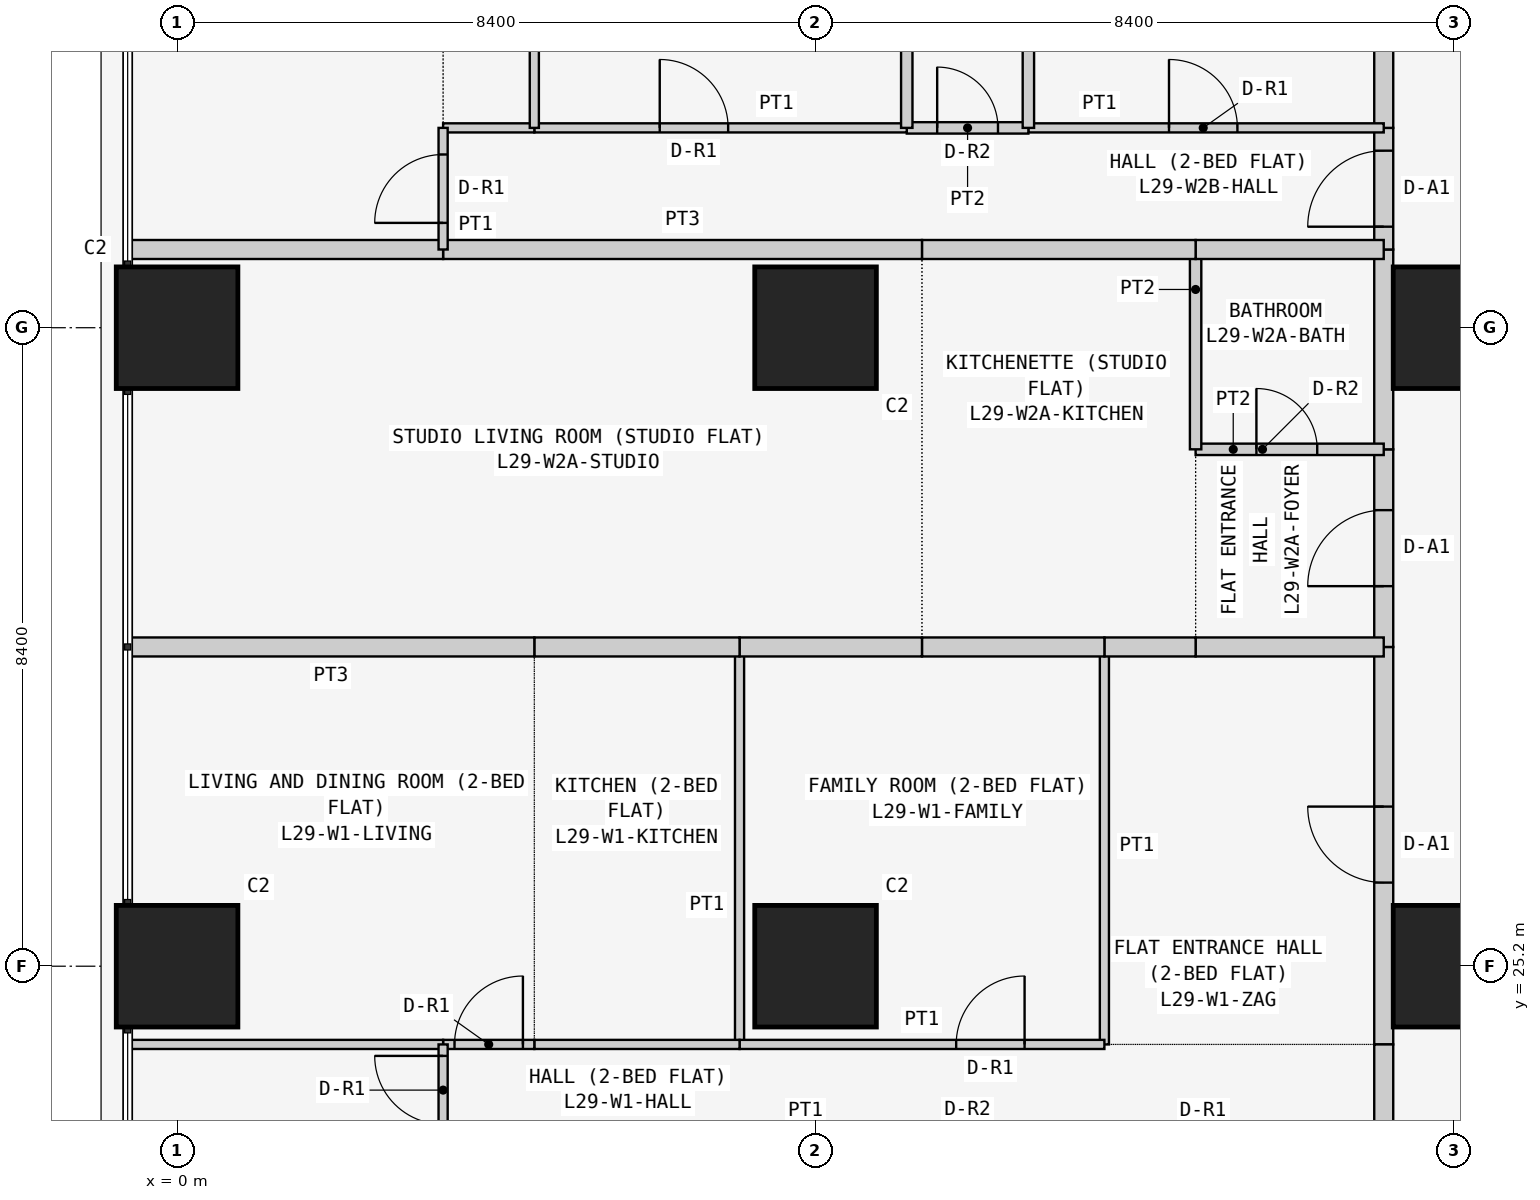
"""IFC4 building model, lengths in metres.
Left out: names, types, materials, properties, quantities, classifications, styles, units other than length and angle.
Written with IfcOpenShell. Run it as: python <this file> out.ifc"""

import sys

from ifc_helpers import new_model, si_unit, direction, frame, frame_2d, origin, origin_2d, place, context, subcontext, project, spatial, rectangle, extrude, element, fill, save


model = new_model("IFC4")
c1 = context("Model", 3, precision=1e-05, world=origin(), true_north=direction((0.0, 1.0)))
c2 = subcontext(c1, "Body", "Model", "MODEL_VIEW")
j1 = project(units=[si_unit("LENGTHUNIT", "METRE"), si_unit("PLANEANGLEUNIT", "RADIAN")], contexts=[c1])
p1 = place(None, origin())
s1 = spatial("IfcSite", under=j1, at=p1, CompositionType="ELEMENT")
p2 = place(p1, origin())
s2 = spatial("IfcBuilding", under=s1, at=p2, CompositionType="ELEMENT")
p3 = place(p2, frame((0.0, 0.0, 116.1)))
s3 = spatial("IfcBuildingStorey", under=s2, at=p3, CompositionType="ELEMENT", Elevation=116.1)
for number, where, z_axis, x_axis in (
    (1, (0.0, 25.2, 0.0), (0.0, 0.0, 1.0), (1.0, 0.0, 0.0)),
    (2, (0.0, 33.6, 0.0), (0.0, 0.0, 1.0), (1.0, 0.0, 0.0)),
    (3, (8.4, 25.2, 0.0), (0.0, 0.0, 1.0), (1.0, 0.0, 0.0)),
    (4, (8.4, 33.6, 0.0), (0.0, 0.0, 1.0), (1.0, 0.0, 0.0)),
    (5, (16.8, 25.2, 0.0), (0.0, 0.0, 1.0), (1.0, 0.0, 0.0)),
    (6, (16.8, 33.6, 0.0), (0.0, 0.0, 1.0), (1.0, 0.0, 0.0)),
):
    element("IfcColumn", number, at=place(p3, frame(where, z_axis=z_axis, x_axis=x_axis)), inside=s3, PredefinedType="COLUMN", context=c2, shape_type="SweptSolid", body=[
        extrude(rectangle(XDim=1.6, YDim=1.6, at=origin_2d()), origin(), (0.0, 0.0, 1.0), 3.6),
    ])
p4 = place(p3, frame((15.875, 24.171, 0.0), z_axis=(0.0, 0.0, 1.0), x_axis=(0.0, 1.0, 0.0)))
e7 = element("IfcWall", 7, at=p4, inside=s3, PredefinedType="PARTITIONING", context=c2, shape_type="SweptSolid", body=[
    extrude(rectangle(XDim=5.229, YDim=0.25, at=frame_2d((2.615, 0.0))), origin(), (0.0, 0.0, 1.0), 3.45),
])
p5 = place(p4, frame((2.129, 0.0, 0.0)))
e8 = element("IfcOpeningElement", 8, at=p5, cuts=e7, PredefinedType="OPENING", context=c2, shape_type="SweptSolid", body=[
    extrude(rectangle(XDim=1.0, YDim=2.1, at=frame_2d((0.5, 1.05))), frame((0.0, 0.135, 0.0), z_axis=(0.0, -1.0, 0.0), x_axis=(1.0, 0.0, 0.0)), (0.0, 0.0, 1.0), 0.27),
])
p6 = place(p3, frame((15.875, 22.971, 0.0), z_axis=(0.0, 0.0, 1.0), x_axis=(0.0, 1.0, 0.0)))
e9 = element("IfcWall", 9, at=p6, inside=s3, PredefinedType="PARTITIONING", context=c2, shape_type="SweptSolid", body=[
    extrude(rectangle(XDim=1.2, YDim=0.25, at=frame_2d((0.6, 0.0))), origin(), (0.0, 0.0, 1.0), 3.45),
])
p7 = place(p3, frame((15.875, 29.4, 0.0), z_axis=(0.0, 0.0, 1.0), x_axis=(0.0, 1.0, 0.0)))
e10 = element("IfcWall", 10, at=p7, inside=s3, PredefinedType="PARTITIONING", context=c2, shape_type="SweptSolid", body=[
    extrude(rectangle(XDim=2.6, YDim=0.25, at=frame_2d((1.3, 0.0))), origin(), (0.0, 0.0, 1.0), 3.45),
])
p8 = place(p7, frame((0.8, 0.0, 0.0)))
e11 = element("IfcOpeningElement", 11, at=p8, cuts=e10, PredefinedType="OPENING", context=c2, shape_type="SweptSolid", body=[
    extrude(rectangle(XDim=1.0, YDim=2.1, at=frame_2d((0.5, 1.05))), frame((0.0, 0.135, 0.0), z_axis=(0.0, -1.0, 0.0), x_axis=(1.0, 0.0, 0.0)), (0.0, 0.0, 1.0), 0.27),
])
p9 = place(p3, frame((15.875, 32.0, 0.0), z_axis=(0.0, 0.0, 1.0), x_axis=(0.0, 1.0, 0.0)))
e12 = element("IfcWall", 12, at=p9, inside=s3, PredefinedType="PARTITIONING", context=c2, shape_type="SweptSolid", body=[
    extrude(rectangle(XDim=2.629, YDim=0.25, at=frame_2d((1.314, 0.0))), origin(), (0.0, 0.0, 1.0), 3.45),
])
p10 = place(p3, frame((15.875, 34.629, 0.0), z_axis=(0.0, 0.0, 1.0), x_axis=(0.0, 1.0, 0.0)))
e13 = element("IfcWall", 13, at=p10, inside=s3, PredefinedType="PARTITIONING", context=c2, shape_type="SweptSolid", body=[
    extrude(rectangle(XDim=1.6, YDim=0.25, at=frame_2d((0.8, 0.0))), origin(), (0.0, 0.0, 1.0), 3.45),
])
p11 = place(p10, frame((0.3, 0.0, 0.0)))
e14 = element("IfcOpeningElement", 14, at=p11, cuts=e13, PredefinedType="OPENING", context=c2, shape_type="SweptSolid", body=[
    extrude(rectangle(XDim=1.0, YDim=2.1, at=frame_2d((0.5, 1.05))), frame((0.0, 0.135, 0.0), z_axis=(0.0, -1.0, 0.0), x_axis=(1.0, 0.0, 0.0)), (0.0, 0.0, 1.0), 0.27),
])
p12 = place(p3, frame((15.875, 36.229, 0.0), z_axis=(0.0, 0.0, 1.0), x_axis=(0.0, 1.0, 0.0)))
e15 = element("IfcWall", 15, at=p12, inside=s3, PredefinedType="PARTITIONING", context=c2, shape_type="SweptSolid", body=[
    extrude(rectangle(XDim=6.471, YDim=0.25, at=frame_2d((3.235, 0.0))), origin(), (0.0, 0.0, 1.0), 3.45),
])
p13 = place(p3, frame((12.2, 29.4, 0.0), z_axis=(0.0, 0.0, 1.0), x_axis=(0.0, -1.0, 0.0)))
e16 = element("IfcWall", 16, at=p13, inside=s3, PredefinedType="PARTITIONING", context=c2, shape_type="SweptSolid", body=[
    extrude(rectangle(XDim=5.229, YDim=0.12, at=frame_2d((2.615, 0.0))), origin(), (0.0, 0.0, 1.0), 3.45),
])
p14 = place(p3, frame((15.875, 29.4, 0.0), z_axis=(0.0, 0.0, 1.0), x_axis=(-1.0, 0.0, 0.0)))
e17 = element("IfcWall", 17, at=p14, inside=s3, PredefinedType="PARTITIONING", context=c2, shape_type="SweptSolid", body=[
    extrude(rectangle(XDim=2.475, YDim=0.25, at=frame_2d((1.238, 0.0))), origin(), (0.0, 0.0, 1.0), 3.45),
])
p15 = place(p3, frame((13.4, 29.4, 0.0), z_axis=(0.0, 0.0, 1.0), x_axis=(-1.0, 0.0, 0.0)))
e18 = element("IfcWall", 18, at=p15, inside=s3, PredefinedType="PARTITIONING", context=c2, shape_type="SweptSolid", body=[
    extrude(rectangle(XDim=1.2, YDim=0.25, at=frame_2d((0.6, 0.0))), origin(), (0.0, 0.0, 1.0), 3.45),
])
p16 = place(p3, frame((7.4, 29.4, 0.0), z_axis=(0.0, 0.0, 1.0), x_axis=(0.0, -1.0, 0.0)))
e19 = element("IfcWall", 19, at=p16, inside=s3, PredefinedType="PARTITIONING", context=c2, shape_type="SweptSolid", body=[
    extrude(rectangle(XDim=5.229, YDim=0.12, at=frame_2d((2.615, 0.0))), origin(), (0.0, 0.0, 1.0), 3.45),
])
p17 = place(p3, frame((7.4, 24.171, 0.0), z_axis=(0.0, 0.0, 1.0), x_axis=(1.0, 0.0, 0.0)))
e20 = element("IfcWall", 20, at=p17, inside=s3, PredefinedType="PARTITIONING", context=c2, shape_type="SweptSolid", body=[
    extrude(rectangle(XDim=4.8, YDim=0.12, at=frame_2d((2.4, 0.0))), origin(), (0.0, 0.0, 1.0), 3.45),
])
p18 = place(p17, frame((2.85, 0.0, 0.0)))
e21 = element("IfcOpeningElement", 21, at=p18, cuts=e20, PredefinedType="OPENING", context=c2, shape_type="SweptSolid", body=[
    extrude(rectangle(XDim=0.9, YDim=2.1, at=frame_2d((0.45, 1.05))), frame((0.0, 0.07, 0.0), z_axis=(0.0, -1.0, 0.0), x_axis=(1.0, 0.0, 0.0)), (0.0, 0.0, 1.0), 0.14),
])
p19 = place(p3, frame((12.2, 29.4, 0.0), z_axis=(0.0, 0.0, 1.0), x_axis=(-1.0, 0.0, 0.0)))
e22 = element("IfcWall", 22, at=p19, inside=s3, PredefinedType="PARTITIONING", context=c2, shape_type="SweptSolid", body=[
    extrude(rectangle(XDim=2.4, YDim=0.25, at=frame_2d((1.2, 0.0))), origin(), (0.0, 0.0, 1.0), 3.45),
])
p20 = place(p3, frame((9.8, 29.4, 0.0), z_axis=(0.0, 0.0, 1.0), x_axis=(-1.0, 0.0, 0.0)))
e23 = element("IfcWall", 23, at=p20, inside=s3, PredefinedType="PARTITIONING", context=c2, shape_type="SweptSolid", body=[
    extrude(rectangle(XDim=2.4, YDim=0.25, at=frame_2d((1.2, 0.0))), origin(), (0.0, 0.0, 1.0), 3.45),
])
p21 = place(p3, frame((4.7, 24.171, 0.0), z_axis=(0.0, 0.0, 1.0), x_axis=(1.0, 0.0, 0.0)))
e24 = element("IfcWall", 24, at=p21, inside=s3, PredefinedType="PARTITIONING", context=c2, shape_type="SweptSolid", body=[
    extrude(rectangle(XDim=2.7, YDim=0.12, at=frame_2d((1.35, 0.0))), origin(), (0.0, 0.0, 1.0), 3.45),
])
p22 = place(p3, frame((7.4, 29.4, 0.0), z_axis=(0.0, 0.0, 1.0), x_axis=(-1.0, 0.0, 0.0)))
e25 = element("IfcWall", 25, at=p22, inside=s3, PredefinedType="PARTITIONING", context=c2, shape_type="SweptSolid", body=[
    extrude(rectangle(XDim=2.7, YDim=0.25, at=frame_2d((1.35, 0.0))), origin(), (0.0, 0.0, 1.0), 3.45),
])
p23 = place(p3, frame((3.5, 24.171, 0.0), z_axis=(0.0, 0.0, 1.0), x_axis=(1.0, 0.0, 0.0)))
e26 = element("IfcWall", 26, at=p23, inside=s3, PredefinedType="PARTITIONING", context=c2, shape_type="SweptSolid", body=[
    extrude(rectangle(XDim=1.2, YDim=0.12, at=frame_2d((0.6, 0.0))), origin(), (0.0, 0.0, 1.0), 3.45),
])
p24 = place(p23, frame((0.15, 0.0, 0.0)))
e27 = element("IfcOpeningElement", 27, at=p24, cuts=e26, PredefinedType="OPENING", context=c2, shape_type="SweptSolid", body=[
    extrude(rectangle(XDim=0.9, YDim=2.1, at=frame_2d((0.45, 1.05))), frame((0.0, 0.07, 0.0), z_axis=(0.0, -1.0, 0.0), x_axis=(1.0, 0.0, 0.0)), (0.0, 0.0, 1.0), 0.14),
])
p25 = place(p3, frame((-0.65, 24.171, 0.0), z_axis=(0.0, 0.0, 1.0), x_axis=(1.0, 0.0, 0.0)))
e28 = element("IfcWall", 28, at=p25, inside=s3, PredefinedType="PARTITIONING", context=c2, shape_type="SweptSolid", body=[
    extrude(rectangle(XDim=4.15, YDim=0.12, at=frame_2d((2.075, 0.0))), origin(), (0.0, 0.0, 1.0), 3.45),
])
p26 = place(p3, frame((4.7, 29.4, 0.0), z_axis=(0.0, 0.0, 1.0), x_axis=(-1.0, 0.0, 0.0)))
e29 = element("IfcWall", 29, at=p26, inside=s3, PredefinedType="PARTITIONING", context=c2, shape_type="SweptSolid", body=[
    extrude(rectangle(XDim=5.35, YDim=0.25, at=frame_2d((2.675, 0.0))), origin(), (0.0, 0.0, 1.0), 3.45),
])
p27 = place(p3, frame((3.5, 24.171, 0.0), z_axis=(0.0, 0.0, 1.0), x_axis=(0.0, -1.0, 0.0)))
e30 = element("IfcWall", 30, at=p27, inside=s3, PredefinedType="PARTITIONING", context=c2, shape_type="SweptSolid", body=[
    extrude(rectangle(XDim=1.2, YDim=0.12, at=frame_2d((0.6, 0.0))), origin(), (0.0, 0.0, 1.0), 3.45),
])
p28 = place(p27, frame((0.151, 0.0, 0.0)))
e31 = element("IfcOpeningElement", 31, at=p28, cuts=e30, PredefinedType="OPENING", context=c2, shape_type="SweptSolid", body=[
    extrude(rectangle(XDim=0.9, YDim=2.1, at=frame_2d((0.45, 1.05))), frame((0.0, 0.07, 0.0), z_axis=(0.0, -1.0, 0.0), x_axis=(1.0, 0.0, 0.0)), (0.0, 0.0, 1.0), 0.14),
])
p29 = place(p3, frame((13.4, 32.0, 0.0), z_axis=(0.0, 0.0, 1.0), x_axis=(1.0, 0.0, 0.0)))
e32 = element("IfcWall", 32, at=p29, inside=s3, PredefinedType="PARTITIONING", context=c2, shape_type="SweptSolid", body=[
    extrude(rectangle(XDim=2.475, YDim=0.15, at=frame_2d((1.238, 0.0))), origin(), (0.0, 0.0, 1.0), 3.45),
])
p30 = place(p29, frame((0.8, 0.0, 0.0)))
e33 = element("IfcOpeningElement", 33, at=p30, cuts=e32, PredefinedType="OPENING", context=c2, shape_type="SweptSolid", body=[
    extrude(rectangle(XDim=0.8, YDim=2.1, at=frame_2d((0.4, 1.05))), frame((0.0, 0.085, 0.0), z_axis=(0.0, -1.0, 0.0), x_axis=(1.0, 0.0, 0.0)), (0.0, 0.0, 1.0), 0.17),
])
p31 = place(p3, frame((13.4, 32.0, 0.0), z_axis=(0.0, 0.0, 1.0), x_axis=(0.0, 1.0, 0.0)))
e34 = element("IfcWall", 34, at=p31, inside=s3, PredefinedType="PARTITIONING", context=c2, shape_type="SweptSolid", body=[
    extrude(rectangle(XDim=2.629, YDim=0.15, at=frame_2d((1.314, 0.0))), origin(), (0.0, 0.0, 1.0), 3.45),
])
p32 = place(p3, frame((13.4, 34.629, 0.0), z_axis=(0.0, 0.0, 1.0), x_axis=(1.0, 0.0, 0.0)))
e35 = element("IfcWall", 35, at=p32, inside=s3, PredefinedType="PARTITIONING", context=c2, shape_type="SweptSolid", body=[
    extrude(rectangle(XDim=2.475, YDim=0.25, at=frame_2d((1.238, 0.0))), origin(), (0.0, 0.0, 1.0), 3.45),
])
p33 = place(p3, frame((9.8, 34.629, 0.0), z_axis=(0.0, 0.0, 1.0), x_axis=(1.0, 0.0, 0.0)))
e36 = element("IfcWall", 36, at=p33, inside=s3, PredefinedType="PARTITIONING", context=c2, shape_type="SweptSolid", body=[
    extrude(rectangle(XDim=3.6, YDim=0.25, at=frame_2d((1.8, 0.0))), origin(), (0.0, 0.0, 1.0), 3.45),
])
p34 = place(p3, frame((3.5, 34.629, 0.0), z_axis=(0.0, 0.0, 1.0), x_axis=(1.0, 0.0, 0.0)))
e37 = element("IfcWall", 37, at=p34, inside=s3, PredefinedType="PARTITIONING", context=c2, shape_type="SweptSolid", body=[
    extrude(rectangle(XDim=6.3, YDim=0.25, at=frame_2d((3.15, 0.0))), origin(), (0.0, 0.0, 1.0), 3.45),
])
p35 = place(p3, frame((-0.65, 34.629, 0.0), z_axis=(0.0, 0.0, 1.0), x_axis=(1.0, 0.0, 0.0)))
e38 = element("IfcWall", 38, at=p35, inside=s3, PredefinedType="PARTITIONING", context=c2, shape_type="SweptSolid", body=[
    extrude(rectangle(XDim=4.15, YDim=0.25, at=frame_2d((2.075, 0.0))), origin(), (0.0, 0.0, 1.0), 3.45),
])
p36 = place(p3, frame((11.2, 36.229, 0.0), z_axis=(0.0, 0.0, 1.0), x_axis=(1.0, 0.0, 0.0)))
e39 = element("IfcWall", 39, at=p36, inside=s3, PredefinedType="PARTITIONING", context=c2, shape_type="SweptSolid", body=[
    extrude(rectangle(XDim=4.675, YDim=0.12, at=frame_2d((2.337, 0.0))), origin(), (0.0, 0.0, 1.0), 3.45),
])
p37 = place(p36, frame((1.85, 0.0, 0.0)))
e40 = element("IfcOpeningElement", 40, at=p37, cuts=e39, PredefinedType="OPENING", context=c2, shape_type="SweptSolid", body=[
    extrude(rectangle(XDim=0.9, YDim=2.1, at=frame_2d((0.45, 1.05))), frame((0.0, 0.07, 0.0), z_axis=(0.0, -1.0, 0.0), x_axis=(1.0, 0.0, 0.0)), (0.0, 0.0, 1.0), 0.14),
])
p38 = place(p3, frame((9.6, 36.229, 0.0), z_axis=(0.0, 0.0, 1.0), x_axis=(1.0, 0.0, 0.0)))
e41 = element("IfcWall", 41, at=p38, inside=s3, PredefinedType="PARTITIONING", context=c2, shape_type="SweptSolid", body=[
    extrude(rectangle(XDim=1.6, YDim=0.15, at=frame_2d((0.8, 0.0))), origin(), (0.0, 0.0, 1.0), 3.45),
])
p39 = place(p38, frame((0.4, 0.0, 0.0)))
e42 = element("IfcOpeningElement", 42, at=p39, cuts=e41, PredefinedType="OPENING", context=c2, shape_type="SweptSolid", body=[
    extrude(rectangle(XDim=0.8, YDim=2.1, at=frame_2d((0.4, 1.05))), frame((0.0, 0.085, 0.0), z_axis=(0.0, -1.0, 0.0), x_axis=(1.0, 0.0, 0.0)), (0.0, 0.0, 1.0), 0.17),
])
p40 = place(p3, frame((4.7, 36.229, 0.0), z_axis=(0.0, 0.0, 1.0), x_axis=(1.0, 0.0, 0.0)))
e43 = element("IfcWall", 43, at=p40, inside=s3, PredefinedType="PARTITIONING", context=c2, shape_type="SweptSolid", body=[
    extrude(rectangle(XDim=4.9, YDim=0.12, at=frame_2d((2.45, 0.0))), origin(), (0.0, 0.0, 1.0), 3.45),
])
p41 = place(p40, frame((1.65, 0.0, 0.0)))
e44 = element("IfcOpeningElement", 44, at=p41, cuts=e43, PredefinedType="OPENING", context=c2, shape_type="SweptSolid", body=[
    extrude(rectangle(XDim=0.9, YDim=2.1, at=frame_2d((0.45, 1.05))), frame((0.0, 0.07, 0.0), z_axis=(0.0, -1.0, 0.0), x_axis=(1.0, 0.0, 0.0)), (0.0, 0.0, 1.0), 0.14),
])
p42 = place(p3, frame((3.5, 36.229, 0.0), z_axis=(0.0, 0.0, 1.0), x_axis=(1.0, 0.0, 0.0)))
e45 = element("IfcWall", 45, at=p42, inside=s3, PredefinedType="PARTITIONING", context=c2, shape_type="SweptSolid", body=[
    extrude(rectangle(XDim=1.2, YDim=0.12, at=frame_2d((0.6, 0.0))), origin(), (0.0, 0.0, 1.0), 3.45),
])
p43 = place(p3, frame((3.5, 34.629, 0.0), z_axis=(0.0, 0.0, 1.0), x_axis=(0.0, 1.0, 0.0)))
e46 = element("IfcWall", 46, at=p43, inside=s3, PredefinedType="PARTITIONING", context=c2, shape_type="SweptSolid", body=[
    extrude(rectangle(XDim=1.6, YDim=0.12, at=frame_2d((0.8, 0.0))), origin(), (0.0, 0.0, 1.0), 3.45),
])
p44 = place(p43, frame((0.35, 0.0, 0.0)))
e47 = element("IfcOpeningElement", 47, at=p44, cuts=e46, PredefinedType="OPENING", context=c2, shape_type="SweptSolid", body=[
    extrude(rectangle(XDim=0.9, YDim=2.1, at=frame_2d((0.45, 1.05))), frame((0.0, 0.07, 0.0), z_axis=(0.0, -1.0, 0.0), x_axis=(1.0, 0.0, 0.0)), (0.0, 0.0, 1.0), 0.14),
])
for number, where, z_axis, x_axis in (
    (48, (11.2, 36.229, 0.0), (0.0, 0.0, 1.0), (0.0, 1.0, 0.0)),
    (49, (9.6, 36.229, 0.0), (0.0, 0.0, 1.0), (0.0, 1.0, 0.0)),
):
    element("IfcWall", number, at=place(p3, frame(where, z_axis=z_axis, x_axis=x_axis)), inside=s3, PredefinedType="PARTITIONING", context=c2, shape_type="SweptSolid", body=[
        extrude(rectangle(XDim=6.471, YDim=0.15, at=frame_2d((3.235, 0.0))), origin(), (0.0, 0.0, 1.0), 3.45),
    ])
p45 = place(p3, frame((4.7, 36.229, 0.0), z_axis=(0.0, 0.0, 1.0), x_axis=(0.0, 1.0, 0.0)))
e50 = element("IfcWall", 50, at=p45, inside=s3, PredefinedType="PARTITIONING", context=c2, shape_type="SweptSolid", body=[
    extrude(rectangle(XDim=6.471, YDim=0.12, at=frame_2d((3.235, 0.0))), origin(), (0.0, 0.0, 1.0), 3.45),
])
p46 = place(p5, origin())
e51 = element("IfcDoor", 51, at=p46, inside=s3, OperationType="SINGLE_SWING_RIGHT", PredefinedType="DOOR", context=c2, shape_type="SweptSolid", body=[
    extrude(rectangle(XDim=1.0, YDim=2.1, at=frame_2d((0.5, 1.05))), frame((0.0, 0.025, 0.0), z_axis=(0.0, -1.0, 0.0), x_axis=(1.0, 0.0, 0.0)), (0.0, 0.0, 1.0), 0.05),
])
fill(e8, e51)
p47 = place(p18, origin())
e52 = element("IfcDoor", 52, at=p47, inside=s3, OperationType="SINGLE_SWING_RIGHT", PredefinedType="DOOR", context=c2, shape_type="SweptSolid", body=[
    extrude(rectangle(XDim=0.9, YDim=2.1, at=frame_2d((0.45, 1.05))), frame((0.0, 0.025, 0.0), z_axis=(0.0, -1.0, 0.0), x_axis=(1.0, 0.0, 0.0)), (0.0, 0.0, 1.0), 0.05),
])
fill(e21, e52)
p48 = place(p24, origin())
e53 = element("IfcDoor", 53, at=p48, inside=s3, OperationType="SINGLE_SWING_RIGHT", PredefinedType="DOOR", context=c2, shape_type="SweptSolid", body=[
    extrude(rectangle(XDim=0.9, YDim=2.1, at=frame_2d((0.45, 1.05))), frame((0.0, 0.025, 0.0), z_axis=(0.0, -1.0, 0.0), x_axis=(1.0, 0.0, 0.0)), (0.0, 0.0, 1.0), 0.05),
])
fill(e27, e53)
p49 = place(p28, frame((0.9, 0.0, 0.0), z_axis=(0.0, 0.0, 1.0), x_axis=(-1.0, 0.0, 0.0)))
e54 = element("IfcDoor", 54, at=p49, inside=s3, OperationType="SINGLE_SWING_RIGHT", PredefinedType="DOOR", context=c2, shape_type="SweptSolid", body=[
    extrude(rectangle(XDim=0.9, YDim=2.1, at=frame_2d((0.45, 1.05))), frame((0.0, 0.025, 0.0), z_axis=(0.0, -1.0, 0.0), x_axis=(1.0, 0.0, 0.0)), (0.0, 0.0, 1.0), 0.05),
])
fill(e31, e54)
p50 = place(p8, origin())
e55 = element("IfcDoor", 55, at=p50, inside=s3, OperationType="SINGLE_SWING_LEFT", PredefinedType="DOOR", context=c2, shape_type="SweptSolid", body=[
    extrude(rectangle(XDim=1.0, YDim=2.1, at=frame_2d((0.5, 1.05))), frame((0.0, 0.025, 0.0), z_axis=(0.0, -1.0, 0.0), x_axis=(1.0, 0.0, 0.0)), (0.0, 0.0, 1.0), 0.05),
])
fill(e11, e55)
p51 = place(p30, origin())
e56 = element("IfcDoor", 56, at=p51, inside=s3, OperationType="SINGLE_SWING_LEFT", PredefinedType="DOOR", context=c2, shape_type="SweptSolid", body=[
    extrude(rectangle(XDim=0.8, YDim=2.1, at=frame_2d((0.4, 1.05))), frame((0.0, 0.025, 0.0), z_axis=(0.0, -1.0, 0.0), x_axis=(1.0, 0.0, 0.0)), (0.0, 0.0, 1.0), 0.05),
])
fill(e33, e56)
p52 = place(p11, origin())
e57 = element("IfcDoor", 57, at=p52, inside=s3, OperationType="SINGLE_SWING_LEFT", PredefinedType="DOOR", context=c2, shape_type="SweptSolid", body=[
    extrude(rectangle(XDim=1.0, YDim=2.1, at=frame_2d((0.5, 1.05))), frame((0.0, 0.025, 0.0), z_axis=(0.0, -1.0, 0.0), x_axis=(1.0, 0.0, 0.0)), (0.0, 0.0, 1.0), 0.05),
])
fill(e14, e57)
p53 = place(p37, origin())
e58 = element("IfcDoor", 58, at=p53, inside=s3, OperationType="SINGLE_SWING_LEFT", PredefinedType="DOOR", context=c2, shape_type="SweptSolid", body=[
    extrude(rectangle(XDim=0.9, YDim=2.1, at=frame_2d((0.45, 1.05))), frame((0.0, 0.025, 0.0), z_axis=(0.0, -1.0, 0.0), x_axis=(1.0, 0.0, 0.0)), (0.0, 0.0, 1.0), 0.05),
])
fill(e40, e58)
p54 = place(p39, origin())
e59 = element("IfcDoor", 59, at=p54, inside=s3, OperationType="SINGLE_SWING_LEFT", PredefinedType="DOOR", context=c2, shape_type="SweptSolid", body=[
    extrude(rectangle(XDim=0.8, YDim=2.1, at=frame_2d((0.4, 1.05))), frame((0.0, 0.025, 0.0), z_axis=(0.0, -1.0, 0.0), x_axis=(1.0, 0.0, 0.0)), (0.0, 0.0, 1.0), 0.05),
])
fill(e42, e59)
p55 = place(p41, origin())
e60 = element("IfcDoor", 60, at=p55, inside=s3, OperationType="SINGLE_SWING_LEFT", PredefinedType="DOOR", context=c2, shape_type="SweptSolid", body=[
    extrude(rectangle(XDim=0.9, YDim=2.1, at=frame_2d((0.45, 1.05))), frame((0.0, 0.025, 0.0), z_axis=(0.0, -1.0, 0.0), x_axis=(1.0, 0.0, 0.0)), (0.0, 0.0, 1.0), 0.05),
])
fill(e44, e60)
p56 = place(p44, origin())
e61 = element("IfcDoor", 61, at=p56, inside=s3, OperationType="SINGLE_SWING_LEFT", PredefinedType="DOOR", context=c2, shape_type="SweptSolid", body=[
    extrude(rectangle(XDim=0.9, YDim=2.1, at=frame_2d((0.45, 1.05))), frame((0.0, 0.025, 0.0), z_axis=(0.0, -1.0, 0.0), x_axis=(1.0, 0.0, 0.0)), (0.0, 0.0, 1.0), 0.05),
])
fill(e47, e61)
save(model, sys.argv[1])
